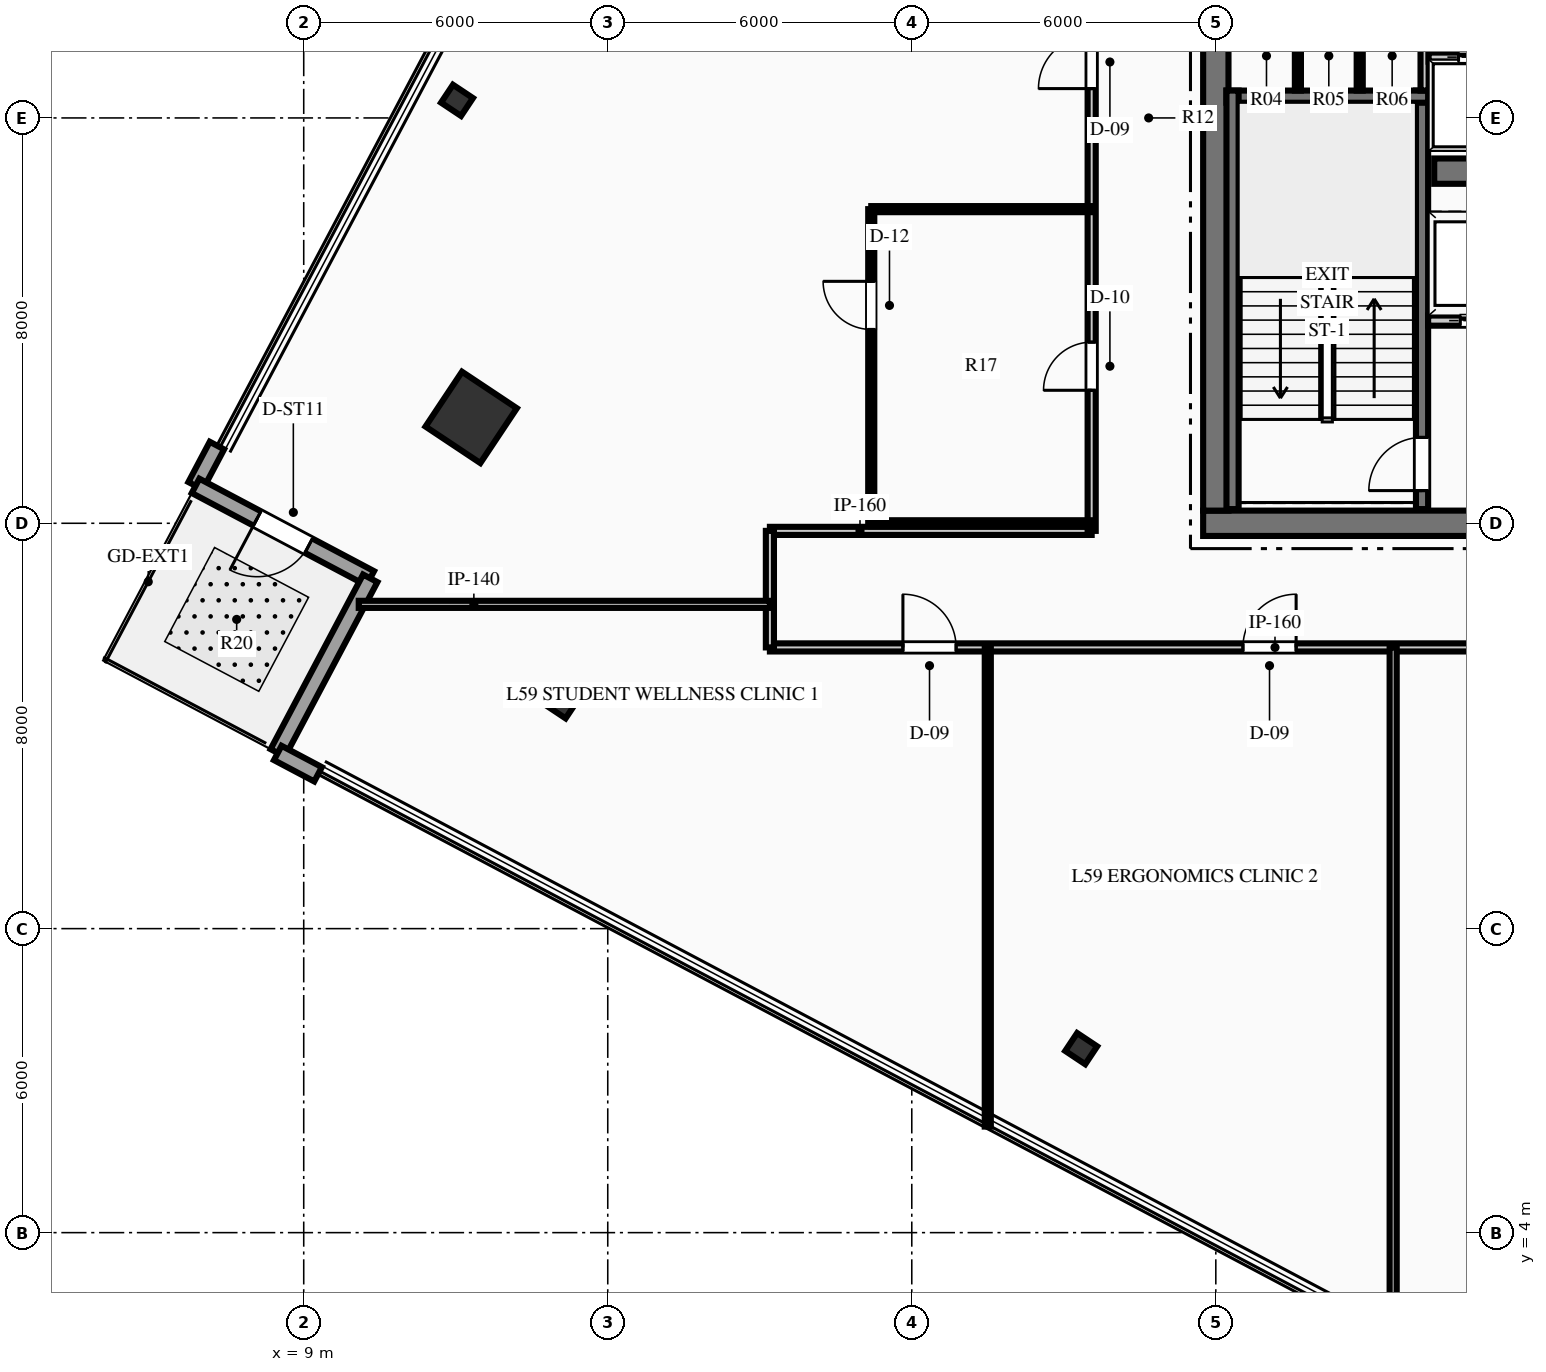
"""IFC4 building model, lengths in metres.
Left out: names, types, materials, properties, quantities, classifications, styles, units other than length and angle.
Written with IfcOpenShell. Run it as: python <this file> out.ifc"""

import sys

from ifc_helpers import new_model, si_unit, direction, frame, frame_2d, origin, origin_2d, place, context, subcontext, project, spatial, rectangle, hollow_rectangle, i_section, extrude, element, fill, save


model = new_model("IFC4")
c1 = context("Model", 3, precision=1e-05, world=origin(), true_north=direction((0.0, 1.0)))
c2 = subcontext(c1, "Body", "Model", "MODEL_VIEW")
j1 = project(units=[si_unit("LENGTHUNIT", "METRE"), si_unit("PLANEANGLEUNIT", "RADIAN")], contexts=[c1])
p1 = place(None, origin())
s1 = spatial("IfcSite", under=j1, at=p1, CompositionType="ELEMENT")
p2 = place(p1, origin())
s2 = spatial("IfcBuilding", under=s1, at=p2, CompositionType="ELEMENT")
p3 = place(p2, frame((0.0, 0.0, 235.95)))
s3 = spatial("IfcBuildingStorey", under=s2, at=p3, CompositionType="ELEMENT", Elevation=235.95)
p4 = place(p3, frame((26.75, 18.0, 0.0), z_axis=(0.0, 0.0, 1.0), x_axis=(1.0, 0.0, 0.0)))
e1 = element("IfcWall", 1, at=p4, inside=s3, PredefinedType="SHEAR", context=c2, shape_type="SweptSolid", body=[
    extrude(rectangle(XDim=18.5, YDim=0.5, at=frame_2d((9.25, 0.0))), origin(), (0.0, 0.0, 1.0), 3.75),
])
p5 = place(p4, frame((7.35, 0.0, 0.0)))
e2 = element("IfcOpeningElement", 2, at=p5, cuts=e1, PredefinedType="OPENING", context=c2, shape_type="SweptSolid", body=[
    extrude(rectangle(XDim=1.1, YDim=2.15, at=frame_2d((0.55, 1.075))), frame((0.0, 0.26, 0.0), z_axis=(0.0, -1.0, 0.0), x_axis=(1.0, 0.0, 0.0)), (0.0, 0.0, 1.0), 0.52),
])
p6 = place(p4, frame((10.05, 0.0, 0.0)))
e3 = element("IfcOpeningElement", 3, at=p6, cuts=e1, PredefinedType="OPENING", context=c2, shape_type="SweptSolid", body=[
    extrude(rectangle(XDim=1.1, YDim=2.15, at=frame_2d((0.55, 1.075))), frame((0.0, 0.26, 0.0), z_axis=(0.0, -1.0, 0.0), x_axis=(1.0, 0.0, 0.0)), (0.0, 0.0, 1.0), 0.52),
])
p7 = place(p3, frame((27.0, 18.25, 0.0), z_axis=(0.0, 0.0, 1.0), x_axis=(0.0, 1.0, 0.0)))
e4 = element("IfcWall", 4, at=p7, inside=s3, PredefinedType="SHEAR", context=c2, shape_type="SweptSolid", body=[
    extrude(rectangle(XDim=15.5, YDim=0.5, at=frame_2d((7.75, 0.0))), origin(), (0.0, 0.0, 1.0), 3.75),
])
p8 = place(p7, frame((9.99, 0.0, 0.0)))
e5 = element("IfcOpeningElement", 5, at=p8, cuts=e4, PredefinedType="OPENING", context=c2, shape_type="SweptSolid", body=[
    extrude(rectangle(XDim=1.4, YDim=2.2, at=frame_2d((0.7, 1.1))), frame((0.0, 0.26, 0.0), z_axis=(0.0, -1.0, 0.0), x_axis=(1.0, 0.0, 0.0)), (0.0, 0.0, 1.0), 0.52),
])
p9 = place(p3, frame((31.31, 24.95, 0.0), z_axis=(0.0, 0.0, 1.0), x_axis=(1.0, 0.0, 0.0)))
e6 = element("IfcWall", 6, at=p9, inside=s3, PredefinedType="SHEAR", context=c2, shape_type="SweptSolid", body=[
    extrude(rectangle(XDim=9.38, YDim=0.5, at=frame_2d((4.69, 0.0))), origin(), (0.0, 0.0, 1.0), 3.75),
])
p10 = place(p3, frame((31.07, 18.28, 0.0), z_axis=(0.0, 0.0, 1.0), x_axis=(0.0, 1.0, 0.0)))
e7 = element("IfcWall", 7, at=p10, inside=s3, PredefinedType="SHEAR", context=c2, shape_type="SweptSolid", body=[
    extrude(rectangle(XDim=8.26, YDim=0.24, at=frame_2d((4.13, 0.0))), origin(), (0.0, 0.0, 1.0), 3.75),
])
p11 = place(p10, frame((0.365, 0.0, 0.0)))
e8 = element("IfcOpeningElement", 8, at=p11, cuts=e7, PredefinedType="OPENING", context=c2, shape_type="SweptSolid", body=[
    extrude(rectangle(XDim=1.05, YDim=2.15, at=frame_2d((0.525, 1.075))), frame((0.0, 0.13, 0.0), z_axis=(0.0, -1.0, 0.0), x_axis=(1.0, 0.0, 0.0)), (0.0, 0.0, 1.0), 0.26),
])
p12 = place(p3, frame((27.21, 26.42, 0.0), z_axis=(0.0, 0.0, 1.0), x_axis=(1.0, 0.0, 0.0)))
e9 = element("IfcWall", 9, at=p12, inside=s3, PredefinedType="SHEAR", context=c2, shape_type="SweptSolid", body=[
    extrude(rectangle(XDim=3.98, YDim=0.24, at=frame_2d((1.99, 0.0))), origin(), (0.0, 0.0, 1.0), 3.75),
])
p13 = place(p3, frame((27.33, 18.28, 0.0), z_axis=(0.0, 0.0, 1.0), x_axis=(0.0, 1.0, 0.0)))
e10 = element("IfcWall", 10, at=p13, inside=s3, PredefinedType="SHEAR", context=c2, shape_type="SweptSolid", body=[
    extrude(rectangle(XDim=8.26, YDim=0.24, at=frame_2d((4.13, 0.0))), origin(), (0.0, 0.0, 1.0), 3.75),
])
p14 = place(p3, frame((12.305, 20.09, 0.0), z_axis=(0.0, 0.0, 1.0), x_axis=(0.554118199338, 0.832437998389, 0.0)))
e11 = element("IfcColumn", 11, at=p14, inside=s3, PredefinedType="COLUMN", context=c2, shape_type="SweptSolid", body=[
    extrude(hollow_rectangle(XDim=1.3, YDim=1.3, WallThickness=0.06, at=origin_2d()), origin(), (0.0, 0.0, 1.0), 3.75),
])
for number, where, z_axis, x_axis in (
    (12, (12.025, 26.347, 0.0), (0.0, 0.0, 1.0), (0.554, 0.832, 0.0)),
    (13, (14.088, 14.458, 0.0), (0.0, 0.0, 1.0), (0.554, 0.832, 0.0)),
    (14, (24.343, 7.631, 0.0), (0.0, 0.0, 1.0), (0.554, 0.832, 0.0)),
):
    element("IfcColumn", number, at=place(p3, frame(where, z_axis=z_axis, x_axis=x_axis)), inside=s3, PredefinedType="COLUMN", context=c2, shape_type="SweptSolid", body=[
        extrude(i_section(OverallWidth=0.424, OverallDepth=0.474, WebThickness=0.048, FlangeThickness=0.077, at=origin_2d()), origin(), (0.0, 0.0, 1.0), 3.75),
    ])
p15 = place(p3, frame((6.866, 18.739, 0.0), z_axis=(0.0, 0.0, 1.0), x_axis=(0.467925110021, 0.883768120839, 0.0)))
e15 = element("IfcWall", 15, at=p15, inside=s3, PredefinedType="STANDARD", context=c2, shape_type="SweptSolid", body=[
    extrude(rectangle(XDim=0.9, YDim=0.32, at=frame_2d((0.45, 0.0))), origin(), (0.0, 0.0, 1.0), 3.4),
])
p16 = place(p3, frame((10.312, 16.914, 0.0), z_axis=(0.0, 0.0, 1.0), x_axis=(-0.883768120839, 0.467925110021, 0.0)))
e16 = element("IfcWall", 16, at=p16, inside=s3, PredefinedType="STANDARD", context=c2, shape_type="SweptSolid", body=[
    extrude(rectangle(XDim=3.9, YDim=0.32, at=frame_2d((1.95, 0.0))), origin(), (0.0, 0.0, 1.0), 3.4),
])
p17 = place(p16, frame((1.375, 0.0, 0.0)))
e17 = element("IfcOpeningElement", 17, at=p17, cuts=e16, PredefinedType="OPENING", context=c2, shape_type="SweptSolid", body=[
    extrude(rectangle(XDim=1.15, YDim=2.2, at=frame_2d((0.575, 1.1))), frame((0.0, 0.17, 0.0), z_axis=(0.0, -1.0, 0.0), x_axis=(1.0, 0.0, 0.0)), (0.0, 0.0, 1.0), 0.34),
])
p18 = place(p3, frame((8.488, 13.467, 0.0), z_axis=(0.0, 0.0, 1.0), x_axis=(0.467925110021, 0.883768120839, 0.0)))
e18 = element("IfcWall", 18, at=p18, inside=s3, PredefinedType="STANDARD", context=c2, shape_type="SweptSolid", body=[
    extrude(rectangle(XDim=3.9, YDim=0.32, at=frame_2d((1.95, 0.0))), origin(), (0.0, 0.0, 1.0), 3.4),
])
p19 = place(p3, frame((9.283, 13.046, 0.0), z_axis=(0.0, 0.0, 1.0), x_axis=(-0.883768120839, 0.467925110021, 0.0)))
e19 = element("IfcWall", 19, at=p19, inside=s3, PredefinedType="STANDARD", context=c2, shape_type="SweptSolid", body=[
    extrude(rectangle(XDim=0.9, YDim=0.32, at=frame_2d((0.45, 0.0))), origin(), (0.0, 0.0, 1.0), 3.4),
])
p20 = place(p3, frame((31.19, 22.0, 0.0), z_axis=(0.0, 0.0, 1.0), x_axis=(1.0, 0.0, 0.0)))
e20 = element("IfcWall", 20, at=p20, inside=s3, PredefinedType="PARTITIONING", context=c2, shape_type="SweptSolid", body=[
    extrude(rectangle(XDim=4.69, YDim=0.2, at=frame_2d((2.345, 0.0))), origin(), (0.0, 0.0, 1.0), 3.4),
])
p21 = place(p20, frame((2.91, 0.0, 0.0)))
e21 = element("IfcOpeningElement", 21, at=p21, cuts=e20, PredefinedType="OPENING", context=c2, shape_type="SweptSolid", body=[
    extrude(rectangle(XDim=0.9, YDim=2.15, at=frame_2d((0.45, 1.075))), frame((0.0, 0.11, 0.0), z_axis=(0.0, -1.0, 0.0), x_axis=(1.0, 0.0, 0.0)), (0.0, 0.0, 1.0), 0.22),
])
p22 = place(p20, frame((0.635, 0.0, 0.0)))
e22 = element("IfcOpeningElement", 22, at=p22, cuts=e20, PredefinedType="OPENING", context=c2, shape_type="SweptSolid", body=[
    extrude(rectangle(XDim=1.1, YDim=2.15, at=frame_2d((0.55, 1.075))), frame((0.0, 0.11, 0.0), z_axis=(0.0, -1.0, 0.0), x_axis=(1.0, 0.0, 0.0)), (0.0, 0.0, 1.0), 0.22),
])
p23 = place(p3, frame((31.12, 26.54, 0.0), z_axis=(0.0, 0.0, 1.0), x_axis=(0.0, 1.0, 0.0)))
e23 = element("IfcWall", 23, at=p23, inside=s3, PredefinedType="PARTITIONING", context=c2, shape_type="SweptSolid", body=[
    extrude(rectangle(XDim=1.51, YDim=0.16, at=frame_2d((0.755, 0.0))), origin(), (0.0, 0.0, 1.0), 3.4),
])
for number, where, z_axis, x_axis in (
    (24, (28.62, 26.54, 0.0), (0.0, 0.0, 1.0), (0.0, 1.0, 0.0)),
    (25, (29.84, 26.54, 0.0), (0.0, 0.0, 1.0), (0.0, 1.0, 0.0)),
):
    element("IfcWall", number, at=place(p3, frame(where, z_axis=z_axis, x_axis=x_axis)), inside=s3, PredefinedType="PARTITIONING", context=c2, shape_type="SweptSolid", body=[
        extrude(rectangle(XDim=1.44, YDim=0.12, at=frame_2d((0.72, 0.0))), origin(), (0.0, 0.0, 1.0), 3.4),
    ])
p24 = place(p3, frame((31.2, 27.2, 0.0), z_axis=(0.0, 0.0, 1.0), x_axis=(1.0, 0.0, 0.0)))
e26 = element("IfcWall", 26, at=p24, inside=s3, PredefinedType="PARTITIONING", context=c2, shape_type="SweptSolid", body=[
    extrude(rectangle(XDim=9.6, YDim=0.18, at=frame_2d((4.8, 0.0))), origin(), (0.0, 0.0, 1.0), 3.4),
])
p25 = place(p24, frame((0.59, 0.0, 0.0)))
e27 = element("IfcOpeningElement", 27, at=p25, cuts=e26, PredefinedType="OPENING", context=c2, shape_type="SweptSolid", body=[
    extrude(rectangle(XDim=1.1, YDim=2.15, at=frame_2d((0.55, 1.075))), frame((0.0, 0.1, 0.0), z_axis=(0.0, -1.0, 0.0), x_axis=(1.0, 0.0, 0.0)), (0.0, 0.0, 1.0), 0.2),
])
p26 = place(p24, frame((2.99, 0.0, 0.0)))
e28 = element("IfcOpeningElement", 28, at=p26, cuts=e26, PredefinedType="OPENING", context=c2, shape_type="SweptSolid", body=[
    extrude(rectangle(XDim=1.1, YDim=2.15, at=frame_2d((0.55, 1.075))), frame((0.0, 0.1, 0.0), z_axis=(0.0, -1.0, 0.0), x_axis=(1.0, 0.0, 0.0)), (0.0, 0.0, 1.0), 0.2),
])
p27 = place(p24, frame((5.51, 0.0, 0.0)))
e29 = element("IfcOpeningElement", 29, at=p27, cuts=e26, PredefinedType="OPENING", context=c2, shape_type="SweptSolid", body=[
    extrude(rectangle(XDim=1.1, YDim=2.15, at=frame_2d((0.55, 1.075))), frame((0.0, 0.1, 0.0), z_axis=(0.0, -1.0, 0.0), x_axis=(1.0, 0.0, 0.0)), (0.0, 0.0, 1.0), 0.2),
])
p28 = place(p24, frame((7.91, 0.0, 0.0)))
e30 = element("IfcOpeningElement", 30, at=p28, cuts=e26, PredefinedType="OPENING", context=c2, shape_type="SweptSolid", body=[
    extrude(rectangle(XDim=1.1, YDim=2.15, at=frame_2d((0.55, 1.075))), frame((0.0, 0.1, 0.0), z_axis=(0.0, -1.0, 0.0), x_axis=(1.0, 0.0, 0.0)), (0.0, 0.0, 1.0), 0.2),
])
p29 = place(p3, frame((18.2, 15.55, 0.0), z_axis=(0.0, 0.0, 1.0), x_axis=(1.0, 0.0, 0.0)))
e31 = element("IfcWall", 31, at=p29, inside=s3, PredefinedType="PARTITIONING", context=c2, shape_type="SweptSolid", body=[
    extrude(rectangle(XDim=35.6, YDim=0.16, at=frame_2d((17.8, 0.0))), origin(), (0.0, 0.0, 1.0), 2.938),
])
p30 = place(p29, frame((2.625, 0.0, 0.0)))
e32 = element("IfcOpeningElement", 32, at=p30, cuts=e31, PredefinedType="OPENING", context=c2, shape_type="SweptSolid", body=[
    extrude(rectangle(XDim=1.05, YDim=2.15, at=frame_2d((0.525, 1.075))), frame((0.0, 0.09, 0.0), z_axis=(0.0, -1.0, 0.0), x_axis=(1.0, 0.0, 0.0)), (0.0, 0.0, 1.0), 0.18),
])
p31 = place(p29, frame((9.335, 0.0, 0.0)))
e33 = element("IfcOpeningElement", 33, at=p31, cuts=e31, PredefinedType="OPENING", context=c2, shape_type="SweptSolid", body=[
    extrude(rectangle(XDim=1.05, YDim=2.15, at=frame_2d((0.525, 1.075))), frame((0.0, 0.09, 0.0), z_axis=(0.0, -1.0, 0.0), x_axis=(1.0, 0.0, 0.0)), (0.0, 0.0, 1.0), 0.18),
])
p32 = place(p29, frame((17.775, 0.0, 0.0)))
e34 = element("IfcOpeningElement", 34, at=p32, cuts=e31, PredefinedType="OPENING", context=c2, shape_type="SweptSolid", body=[
    extrude(rectangle(XDim=1.05, YDim=2.15, at=frame_2d((0.525, 1.075))), frame((0.0, 0.09, 0.0), z_axis=(0.0, -1.0, 0.0), x_axis=(1.0, 0.0, 0.0)), (0.0, 0.0, 1.0), 0.18),
])
p33 = place(p29, frame((26.055, 0.0, 0.0)))
e35 = element("IfcOpeningElement", 35, at=p33, cuts=e31, PredefinedType="OPENING", context=c2, shape_type="SweptSolid", body=[
    extrude(rectangle(XDim=1.05, YDim=2.15, at=frame_2d((0.525, 1.075))), frame((0.0, 0.09, 0.0), z_axis=(0.0, -1.0, 0.0), x_axis=(1.0, 0.0, 0.0)), (0.0, 0.0, 1.0), 0.18),
])
p34 = place(p29, frame((32.265, 0.0, 0.0)))
e36 = element("IfcOpeningElement", 36, at=p34, cuts=e31, PredefinedType="OPENING", context=c2, shape_type="SweptSolid", body=[
    extrude(rectangle(XDim=1.05, YDim=2.15, at=frame_2d((0.525, 1.075))), frame((0.0, 0.09, 0.0), z_axis=(0.0, -1.0, 0.0), x_axis=(1.0, 0.0, 0.0)), (0.0, 0.0, 1.0), 0.18),
])
p35 = place(p3, frame((18.2, 17.85, 0.0), z_axis=(0.0, 0.0, 1.0), x_axis=(1.0, 0.0, 0.0)))
e37 = element("IfcWall", 37, at=p35, inside=s3, PredefinedType="PARTITIONING", context=c2, shape_type="SweptSolid", body=[
    extrude(rectangle(XDim=6.35, YDim=0.16, at=frame_2d((3.175, 0.0))), origin(), (0.0, 0.0, 1.0), 3.4),
])
p36 = place(p3, frame((24.55, 17.85, 0.0), z_axis=(0.0, 0.0, 1.0), x_axis=(0.0, 1.0, 0.0)))
e38 = element("IfcWall", 38, at=p36, inside=s3, PredefinedType="PARTITIONING", context=c2, shape_type="SweptSolid", body=[
    extrude(rectangle(XDim=16.3, YDim=0.16, at=frame_2d((8.15, 0.0))), origin(), (0.0, 0.0, 1.0), 3.4),
])
p37 = place(p36, frame((2.775, 0.0, 0.0)))
e39 = element("IfcOpeningElement", 39, at=p37, cuts=e38, PredefinedType="OPENING", context=c2, shape_type="SweptSolid", body=[
    extrude(rectangle(XDim=0.95, YDim=2.15, at=frame_2d((0.475, 1.075))), frame((0.0, 0.09, 0.0), z_axis=(0.0, -1.0, 0.0), x_axis=(1.0, 0.0, 0.0)), (0.0, 0.0, 1.0), 0.18),
])
p38 = place(p36, frame((8.729, 0.0, 0.0)))
e40 = element("IfcOpeningElement", 40, at=p38, cuts=e38, PredefinedType="OPENING", context=c2, shape_type="SweptSolid", body=[
    extrude(rectangle(XDim=1.05, YDim=2.15, at=frame_2d((0.525, 1.075))), frame((0.0, 0.09, 0.0), z_axis=(0.0, -1.0, 0.0), x_axis=(1.0, 0.0, 0.0)), (0.0, 0.0, 1.0), 0.18),
])
p39 = place(p3, frame((18.2, 15.55, 0.0), z_axis=(0.0, 0.0, 1.0), x_axis=(0.0, 1.0, 0.0)))
e41 = element("IfcWall", 41, at=p39, inside=s3, PredefinedType="PARTITIONING", context=c2, shape_type="SweptSolid", body=[
    extrude(rectangle(XDim=2.3, YDim=0.16, at=frame_2d((1.15, 0.0))), origin(), (0.0, 0.0, 1.0), 3.4),
])
p40 = place(p3, frame((10.086, 16.4, 0.0), z_axis=(0.0, 0.0, 1.0), x_axis=(1.0, 0.0, 0.0)))
e42 = element("IfcWall", 42, at=p40, inside=s3, PredefinedType="PARTITIONING", context=c2, shape_type="SweptSolid", body=[
    extrude(rectangle(XDim=8.114, YDim=0.14, at=frame_2d((4.057, 0.0))), origin(), (0.0, 0.0, 1.0), 3.4),
])
p41 = place(p3, frame((22.5, 6.093, 0.0), z_axis=(0.0, 0.0, 1.0), x_axis=(0.0, 1.0, 0.0)))
e43 = element("IfcWall", 43, at=p41, inside=s3, PredefinedType="PARTITIONING", context=c2, shape_type="SweptSolid", body=[
    extrude(rectangle(XDim=9.457, YDim=0.12, at=frame_2d((4.729, 0.0))), origin(), (0.0, 0.0, 1.0), 3.4),
])
p42 = place(p3, frame((30.5, 1.857, 0.0), z_axis=(0.0, 0.0, 1.0), x_axis=(0.0, 1.0, 0.0)))
e44 = element("IfcWall", 44, at=p42, inside=s3, PredefinedType="PARTITIONING", context=c2, shape_type="SweptSolid", body=[
    extrude(rectangle(XDim=13.693, YDim=0.14, at=frame_2d((6.846, 0.0))), origin(), (0.0, 0.0, 1.0), 3.4),
])
p43 = place(p3, frame((20.2, 18.0, 0.0), z_axis=(0.0, 0.0, 1.0), x_axis=(1.0, 0.0, 0.0)))
e45 = element("IfcWall", 45, at=p43, inside=s3, PredefinedType="PARTITIONING", context=c2, shape_type="SweptSolid", body=[
    extrude(rectangle(XDim=4.35, YDim=0.12, at=frame_2d((2.175, 0.0))), origin(), (0.0, 0.0, 1.0), 3.4),
])
p44 = place(p3, frame((20.2, 18.0, 0.0), z_axis=(0.0, 0.0, 1.0), x_axis=(0.0, 1.0, 0.0)))
e46 = element("IfcWall", 46, at=p44, inside=s3, PredefinedType="PARTITIONING", context=c2, shape_type="SweptSolid", body=[
    extrude(rectangle(XDim=6.2, YDim=0.12, at=frame_2d((3.1, 0.0))), origin(), (0.0, 0.0, 1.0), 3.4),
])
p45 = place(p44, frame((3.825, 0.0, 0.0)))
e47 = element("IfcOpeningElement", 47, at=p45, cuts=e46, PredefinedType="OPENING", context=c2, shape_type="SweptSolid", body=[
    extrude(rectangle(XDim=0.95, YDim=2.15, at=frame_2d((0.475, 1.075))), frame((0.0, 0.07, 0.0), z_axis=(0.0, -1.0, 0.0), x_axis=(1.0, 0.0, 0.0)), (0.0, 0.0, 1.0), 0.14),
])
p46 = place(p3, frame((20.2, 24.2, 0.0), z_axis=(0.0, 0.0, 1.0), x_axis=(1.0, 0.0, 0.0)))
e48 = element("IfcWall", 48, at=p46, inside=s3, PredefinedType="PARTITIONING", context=c2, shape_type="SweptSolid", body=[
    extrude(rectangle(XDim=4.35, YDim=0.12, at=frame_2d((2.175, 0.0))), origin(), (0.0, 0.0, 1.0), 3.4),
])
p47 = place(p17, origin())
e49 = element("IfcDoor", 49, at=p47, inside=s3, OperationType="SINGLE_SWING_RIGHT", PredefinedType="DOOR", context=c2, shape_type="SweptSolid", body=[
    extrude(rectangle(XDim=1.15, YDim=2.2, at=frame_2d((0.575, 1.1))), frame((0.0, 0.025, 0.0), z_axis=(0.0, -1.0, 0.0), x_axis=(1.0, 0.0, 0.0)), (0.0, 0.0, 1.0), 0.05),
])
fill(e17, e49)
p48 = place(p11, origin())
e50 = element("IfcDoor", 50, at=p48, inside=s3, OperationType="SINGLE_SWING_LEFT", PredefinedType="DOOR", context=c2, shape_type="SweptSolid", body=[
    extrude(rectangle(XDim=1.05, YDim=2.15, at=frame_2d((0.525, 1.075))), frame((0.0, 0.025, 0.0), z_axis=(0.0, -1.0, 0.0), x_axis=(1.0, 0.0, 0.0)), (0.0, 0.0, 1.0), 0.05),
])
fill(e8, e50)
p49 = place(p37, origin())
e51 = element("IfcDoor", 51, at=p49, inside=s3, OperationType="SINGLE_SWING_LEFT", PredefinedType="DOOR", context=c2, shape_type="SweptSolid", body=[
    extrude(rectangle(XDim=0.95, YDim=2.15, at=frame_2d((0.475, 1.075))), frame((0.0, 0.025, 0.0), z_axis=(0.0, -1.0, 0.0), x_axis=(1.0, 0.0, 0.0)), (0.0, 0.0, 1.0), 0.05),
])
fill(e39, e51)
p50 = place(p45, origin())
e52 = element("IfcDoor", 52, at=p50, inside=s3, OperationType="SINGLE_SWING_RIGHT", PredefinedType="DOOR", context=c2, shape_type="SweptSolid", body=[
    extrude(rectangle(XDim=0.95, YDim=2.15, at=frame_2d((0.475, 1.075))), frame((0.0, 0.025, 0.0), z_axis=(0.0, -1.0, 0.0), x_axis=(1.0, 0.0, 0.0)), (0.0, 0.0, 1.0), 0.05),
])
fill(e47, e52)
p51 = place(p30, origin())
e53 = element("IfcDoor", 53, at=p51, inside=s3, OperationType="SINGLE_SWING_LEFT", PredefinedType="DOOR", context=c2, shape_type="SweptSolid", body=[
    extrude(rectangle(XDim=1.05, YDim=2.15, at=frame_2d((0.525, 1.075))), frame((0.0, 0.025, 0.0), z_axis=(0.0, -1.0, 0.0), x_axis=(1.0, 0.0, 0.0)), (0.0, 0.0, 1.0), 0.05),
])
fill(e32, e53)
p52 = place(p31, origin())
e54 = element("IfcDoor", 54, at=p52, inside=s3, OperationType="SINGLE_SWING_RIGHT", PredefinedType="DOOR", context=c2, shape_type="SweptSolid", body=[
    extrude(rectangle(XDim=1.05, YDim=2.15, at=frame_2d((0.525, 1.075))), frame((0.0, 0.025, 0.0), z_axis=(0.0, -1.0, 0.0), x_axis=(1.0, 0.0, 0.0)), (0.0, 0.0, 1.0), 0.05),
])
fill(e33, e54)
p53 = place(p38, origin())
e55 = element("IfcDoor", 55, at=p53, inside=s3, OperationType="SINGLE_SWING_LEFT", PredefinedType="DOOR", context=c2, shape_type="SweptSolid", body=[
    extrude(rectangle(XDim=1.05, YDim=2.15, at=frame_2d((0.525, 1.075))), frame((0.0, 0.025, 0.0), z_axis=(0.0, -1.0, 0.0), x_axis=(1.0, 0.0, 0.0)), (0.0, 0.0, 1.0), 0.05),
])
fill(e40, e55)
p54 = place(p25, origin())
e56 = element("IfcDoor", 56, at=p54, inside=s3, OperationType="SLIDING_TO_LEFT", PredefinedType="DOOR", context=c2, shape_type="SweptSolid", body=[
    extrude(rectangle(XDim=1.1, YDim=2.15, at=frame_2d((0.55, 1.075))), frame((0.0, 0.025, 0.0), z_axis=(0.0, -1.0, 0.0), x_axis=(1.0, 0.0, 0.0)), (0.0, 0.0, 1.0), 0.05),
])
fill(e27, e56)
p55 = place(p22, origin())
e57 = element("IfcDoor", 57, at=p55, inside=s3, OperationType="SLIDING_TO_LEFT", PredefinedType="DOOR", context=c2, shape_type="SweptSolid", body=[
    extrude(rectangle(XDim=1.1, YDim=2.15, at=frame_2d((0.55, 1.075))), frame((0.0, 0.025, 0.0), z_axis=(0.0, -1.0, 0.0), x_axis=(1.0, 0.0, 0.0)), (0.0, 0.0, 1.0), 0.05),
])
fill(e22, e57)
save(model, sys.argv[1])
